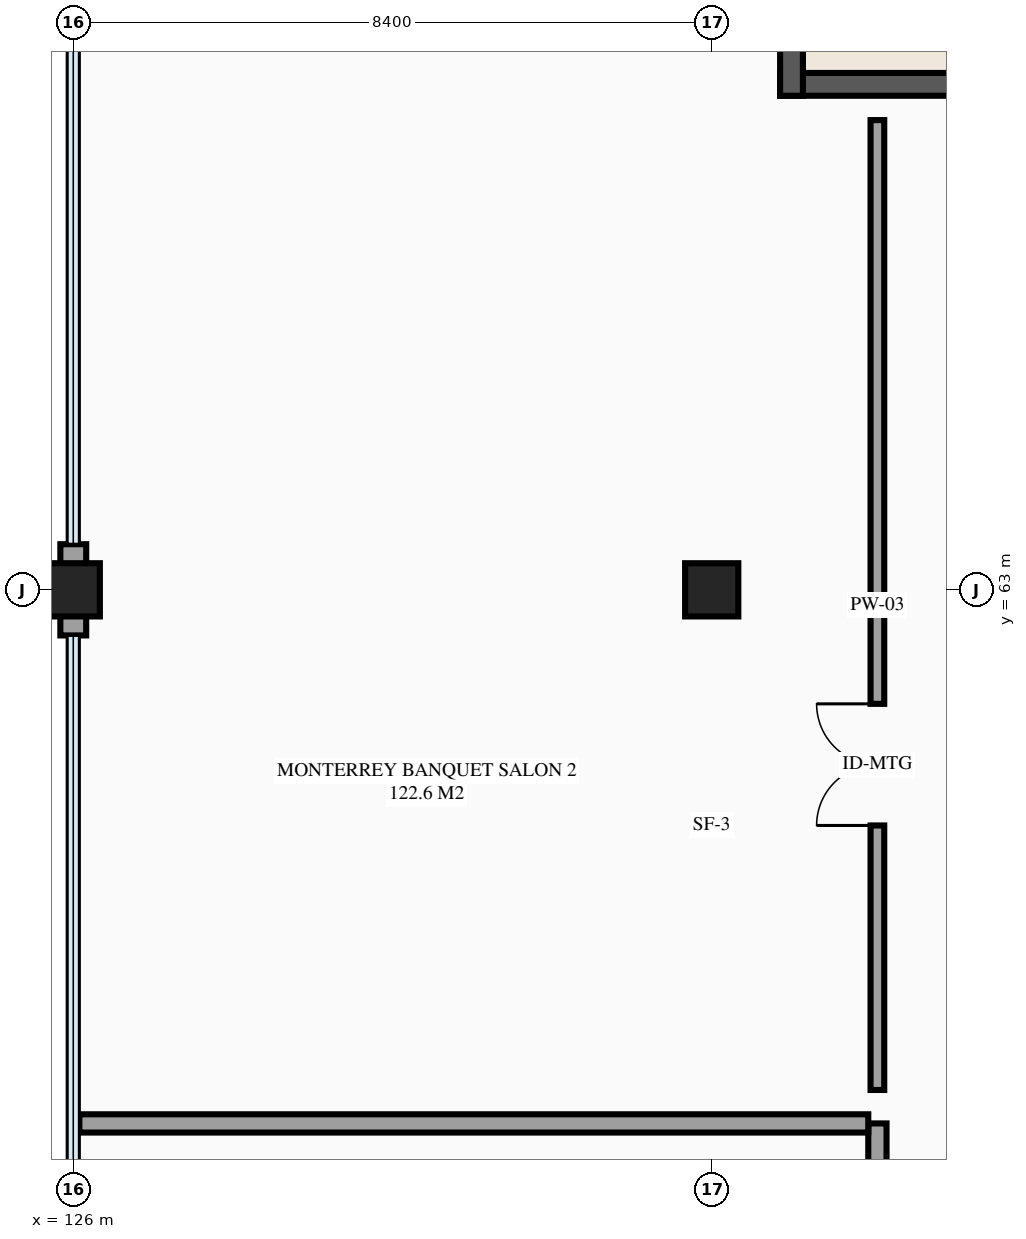
"""IFC4 building model, lengths in metres.
Left out: names, types, materials, properties, quantities, classifications, styles, units other than length and angle.
Written with IfcOpenShell. Run it as: python <this file> out.ifc"""

import sys

from ifc_helpers import new_model, si_unit, direction, frame, frame_2d, origin, origin_2d, place, context, subcontext, project, spatial, rectangle, extrude, element, fill, save


model = new_model("IFC4")
c1 = context("Model", 3, precision=1e-05, world=origin(), true_north=direction((0.0, 1.0)))
c2 = subcontext(c1, "Body", "Model", "MODEL_VIEW")
j1 = project(units=[si_unit("LENGTHUNIT", "METRE"), si_unit("PLANEANGLEUNIT", "RADIAN")], contexts=[c1])
p1 = place(None, origin())
s1 = spatial("IfcSite", under=j1, at=p1, CompositionType="ELEMENT")
p2 = place(p1, origin())
s2 = spatial("IfcBuilding", under=s1, at=p2, CompositionType="ELEMENT")
p3 = place(p2, frame((0.0, 0.0, 9.9)))
s3 = spatial("IfcBuildingStorey", under=s2, at=p3, CompositionType="ELEMENT", Elevation=9.9)
for number, where, z_axis, x_axis in (
    (1, (126.0, 63.0, 0.0), (0.0, 0.0, 1.0), (1.0, 0.0, 0.0)),
    (2, (134.4, 63.0, 0.0), (0.0, 0.0, 1.0), (1.0, 0.0, 0.0)),
):
    element("IfcColumn", number, at=place(p3, frame(where, z_axis=z_axis, x_axis=x_axis)), inside=s3, PredefinedType="COLUMN", context=c2, shape_type="SweptSolid", body=[
        extrude(rectangle(XDim=0.7, YDim=0.7, at=origin_2d()), origin(), (0.0, 0.0, 1.0), 4.2),
    ])
for number, where, z_axis, x_axis in (
    (3, (126.0, 63.0, 0.0), (0.0, 0.0, 1.0), (0.0, -1.0, 0.0)),
    (4, (126.0, 63.6, 0.0), (0.0, 0.0, 1.0), (0.0, -1.0, 0.0)),
):
    element("IfcWall", number, at=place(p3, frame(where, z_axis=z_axis, x_axis=x_axis)), inside=s3, PredefinedType="STANDARD", context=c2, shape_type="SweptSolid", body=[
        extrude(rectangle(XDim=0.6, YDim=0.34, at=frame_2d((0.3, 0.0))), origin(), (0.0, 0.0, 1.0), 4.2),
    ])
p4 = place(p3, frame((135.3, 69.65, 0.0), z_axis=(0.0, 0.0, 1.0), x_axis=(1.0, 0.0, 0.0)))
e5 = element("IfcWall", 5, at=p4, inside=s3, PredefinedType="SHEAR", context=c2, shape_type="SweptSolid", body=[
    extrude(rectangle(XDim=5.2, YDim=0.3, at=frame_2d((2.6, 0.0))), origin(), (0.0, 0.0, 1.0), 2.65),
])
p5 = place(p3, frame((135.45, 78.34, 0.0), z_axis=(0.0, 0.0, 1.0), x_axis=(0.0, -1.0, 0.0)))
e6 = element("IfcWall", 6, at=p5, inside=s3, PredefinedType="SHEAR", context=c2, shape_type="SweptSolid", body=[
    extrude(rectangle(XDim=8.84, YDim=0.3, at=frame_2d((4.42, 0.0))), origin(), (0.0, 0.0, 1.0), 2.65),
])
p6 = place(p3, frame((136.58, 38.42, 0.0), z_axis=(0.0, 0.0, 1.0), x_axis=(0.0, 1.0, 0.0)))
e7 = element("IfcWall", 7, at=p6, inside=s3, PredefinedType="PARTITIONING", context=c2, shape_type="SweptSolid", body=[
    extrude(rectangle(XDim=17.56, YDim=0.24, at=frame_2d((8.78, 0.0))), origin(), (0.0, 0.0, 1.0), 3.955),
])
p7 = place(p6, frame((9.33, 0.0, 0.0)))
e8 = element("IfcOpeningElement", 8, at=p7, cuts=e7, PredefinedType="OPENING", context=c2, shape_type="SweptSolid", body=[
    extrude(rectangle(XDim=1.7, YDim=2.2, at=frame_2d((0.85, 1.1))), frame((0.0, 0.13, 0.0), z_axis=(0.0, -1.0, 0.0), x_axis=(1.0, 0.0, 0.0)), (0.0, 0.0, 1.0), 0.26),
])
p8 = place(p3, frame((126.08, 55.98, 0.0), z_axis=(0.0, 0.0, 1.0), x_axis=(1.0, 0.0, 0.0)))
e9 = element("IfcWall", 9, at=p8, inside=s3, PredefinedType="PARTITIONING", context=c2, shape_type="SweptSolid", body=[
    extrude(rectangle(XDim=10.38, YDim=0.24, at=frame_2d((5.19, 0.0))), origin(), (0.0, 0.0, 1.0), 3.955),
])
p9 = place(p3, frame((136.58, 56.42, 0.0), z_axis=(0.0, 0.0, 1.0), x_axis=(0.0, 1.0, 0.0)))
e10 = element("IfcWall", 10, at=p9, inside=s3, PredefinedType="PARTITIONING", context=c2, shape_type="SweptSolid", body=[
    extrude(rectangle(XDim=12.76, YDim=0.18, at=frame_2d((6.38, 0.0))), origin(), (0.0, 0.0, 1.0), 3.955),
])
p10 = place(p9, frame((3.48, 0.0, 0.0)))
e11 = element("IfcOpeningElement", 11, at=p10, cuts=e10, PredefinedType="OPENING", context=c2, shape_type="SweptSolid", body=[
    extrude(rectangle(XDim=1.6, YDim=2.25, at=frame_2d((0.8, 1.125))), frame((0.0, 0.1, 0.0), z_axis=(0.0, -1.0, 0.0), x_axis=(1.0, 0.0, 0.0)), (0.0, 0.0, 1.0), 0.2),
])
p11 = place(p10, origin())
e12 = element("IfcDoor", 12, at=p11, inside=s3, OperationType="DOUBLE_DOOR_SINGLE_SWING", PredefinedType="DOOR", context=c2, shape_type="SweptSolid", body=[
    extrude(rectangle(XDim=1.6, YDim=2.25, at=frame_2d((0.8, 1.125))), frame((0.0, 0.025, 0.0), z_axis=(0.0, -1.0, 0.0), x_axis=(1.0, 0.0, 0.0)), (0.0, 0.0, 1.0), 0.05),
])
fill(e11, e12)
save(model, sys.argv[1])
